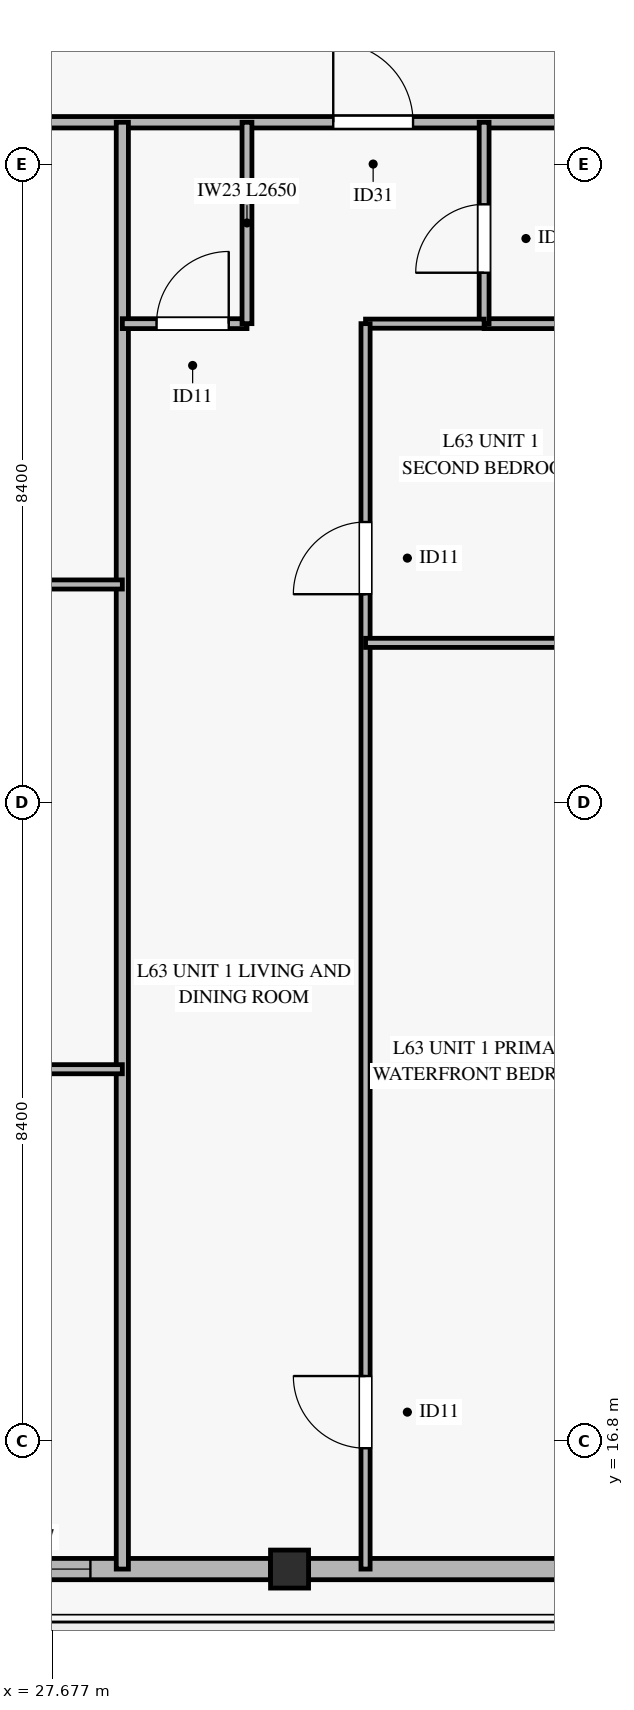
"""IFC4 building model, lengths in metres.
Left out: names, types, materials, properties, quantities, classifications, styles, units other than length and angle.
Written with IfcOpenShell. Run it as: python <this file> out.ifc"""

import sys

from ifc_helpers import new_model, si_unit, direction, frame, frame_2d, origin, origin_2d, place, context, subcontext, project, spatial, rectangle, hollow_rectangle, extrude, source, transform, mapped, element, fill, save


model = new_model("IFC4")
c1 = context("Model", 3, precision=1e-05, world=origin(), true_north=direction((0.0, 1.0)))
c2 = subcontext(c1, "Body", "Model", "MODEL_VIEW")
j1 = project(units=[si_unit("LENGTHUNIT", "METRE"), si_unit("PLANEANGLEUNIT", "RADIAN")], contexts=[c1])
p1 = place(None, origin())
s1 = spatial("IfcSite", under=j1, at=p1, CompositionType="ELEMENT")
p2 = place(p1, origin())
s2 = spatial("IfcBuilding", under=s1, at=p2, CompositionType="ELEMENT")
p3 = place(p2, frame((0.0, 0.0, 248.5)))
s3 = spatial("IfcBuildingStorey", under=s2, at=p3, CompositionType="ELEMENT", Elevation=248.5)
m1 = source(origin(), c2, "Body", "SweptSolid", [
    extrude(hollow_rectangle(XDim=0.5, YDim=0.5, WallThickness=0.024, at=origin_2d()), origin(), (0.0, 0.0, 1.0), 3.185),
])
p4 = place(p3, frame((30.8, 15.113, 0.0), z_axis=(0.0, 0.0, 1.0), x_axis=(1.0, 0.0, 0.0)))
e1 = element("IfcColumn", 1, at=p4, inside=s3, PredefinedType="COLUMN", context=c2, shape_type="MappedRepresentation", body=[
    mapped(m1, transform((0.0, 0.0, 0.0), x_axis=(1.0, 0.0, 0.0), y_axis=(0.0, 1.0, 0.0), z_axis=(0.0, 0.0, 1.0), scale=1.0)),
])
p5 = place(p3, frame((20.1, 15.113, 0.0), z_axis=(0.0, 0.0, 1.0), x_axis=(1.0, 0.0, 0.0)))
e2 = element("IfcWall", 2, at=p5, inside=s3, PredefinedType="SOLIDWALL", context=c2, shape_type="SweptSolid", body=[
    extrude(rectangle(XDim=10.45, YDim=0.28, at=frame_2d((5.225, 0.0))), origin(), (0.0, 0.0, 1.0), 2.815),
])
p6 = place(p5, frame((4.3, 0.0, 0.0)))
e3 = element("IfcOpeningElement", 3, at=p6, cuts=e2, PredefinedType="OPENING", context=c2, shape_type="SweptSolid", body=[
    extrude(rectangle(XDim=1.8, YDim=2.25, at=frame_2d((0.9, 1.125))), frame((0.0, 0.15, 0.0), z_axis=(0.0, -1.0, 0.0), x_axis=(1.0, 0.0, 0.0)), (0.0, 0.0, 1.0), 0.3),
])
p7 = place(p5, frame((0.505, 0.0, 0.45)))
e4 = element("IfcOpeningElement", 4, at=p7, cuts=e2, PredefinedType="OPENING", context=c2, shape_type="SweptSolid", body=[
    extrude(rectangle(XDim=1.2, YDim=2.0, at=frame_2d((0.6, 1.0))), frame((0.0, 0.15, 0.0), z_axis=(0.0, -1.0, 0.0), x_axis=(1.0, 0.0, 0.0)), (0.0, 0.0, 1.0), 0.3),
])
p8 = place(p5, frame((6.48, 0.0, 0.45)))
e5 = element("IfcOpeningElement", 5, at=p8, cuts=e2, PredefinedType="OPENING", context=c2, shape_type="SweptSolid", body=[
    extrude(rectangle(XDim=1.6, YDim=2.0, at=frame_2d((0.8, 1.0))), frame((0.0, 0.15, 0.0), z_axis=(0.0, -1.0, 0.0), x_axis=(1.0, 0.0, 0.0)), (0.0, 0.0, 1.0), 0.3),
])
p9 = place(p3, frame((31.05, 15.113, 0.0), z_axis=(0.0, 0.0, 1.0), x_axis=(1.0, 0.0, 0.0)))
e6 = element("IfcWall", 6, at=p9, inside=s3, PredefinedType="SOLIDWALL", context=c2, shape_type="SweptSolid", body=[
    extrude(rectangle(XDim=6.25, YDim=0.28, at=frame_2d((3.125, 0.0))), origin(), (0.0, 0.0, 1.0), 2.815),
])
p10 = place(p3, frame((8.364, 34.15, 0.0), z_axis=(0.0, 0.0, 1.0), x_axis=(1.0, 0.0, 0.0)))
e7 = element("IfcWall", 7, at=p10, inside=s3, PredefinedType="PARTITIONING", context=c2, shape_type="SweptSolid", body=[
    extrude(rectangle(XDim=53.673, YDim=0.15, at=frame_2d((26.836, 0.0))), origin(), (0.0, 0.0, 1.0), 2.47),
])
p11 = place(p10, frame((5.627, 0.0, 0.0)))
e8 = element("IfcOpeningElement", 8, at=p11, cuts=e7, PredefinedType="OPENING", context=c2, shape_type="SweptSolid", body=[
    extrude(rectangle(XDim=1.05, YDim=2.15, at=frame_2d((0.525, 1.075))), frame((0.0, 0.085, 0.0), z_axis=(0.0, -1.0, 0.0), x_axis=(1.0, 0.0, 0.0)), (0.0, 0.0, 1.0), 0.17),
])
p12 = place(p10, frame((16.561, 0.0, 0.0)))
e9 = element("IfcOpeningElement", 9, at=p12, cuts=e7, PredefinedType="OPENING", context=c2, shape_type="SweptSolid", body=[
    extrude(rectangle(XDim=1.05, YDim=2.15, at=frame_2d((0.525, 1.075))), frame((0.0, 0.085, 0.0), z_axis=(0.0, -1.0, 0.0), x_axis=(1.0, 0.0, 0.0)), (0.0, 0.0, 1.0), 0.17),
])
p13 = place(p10, frame((23.011, 0.0, 0.0)))
e10 = element("IfcOpeningElement", 10, at=p13, cuts=e7, PredefinedType="OPENING", context=c2, shape_type="SweptSolid", body=[
    extrude(rectangle(XDim=1.05, YDim=2.15, at=frame_2d((0.525, 1.075))), frame((0.0, 0.085, 0.0), z_axis=(0.0, -1.0, 0.0), x_axis=(1.0, 0.0, 0.0)), (0.0, 0.0, 1.0), 0.17),
])
p14 = place(p10, frame((29.411, 0.0, 0.0)))
e11 = element("IfcOpeningElement", 11, at=p14, cuts=e7, PredefinedType="OPENING", context=c2, shape_type="SweptSolid", body=[
    extrude(rectangle(XDim=1.05, YDim=2.15, at=frame_2d((0.525, 1.075))), frame((0.0, 0.085, 0.0), z_axis=(0.0, -1.0, 0.0), x_axis=(1.0, 0.0, 0.0)), (0.0, 0.0, 1.0), 0.17),
])
p15 = place(p10, frame((36.511, 0.0, 0.0)))
e12 = element("IfcOpeningElement", 12, at=p15, cuts=e7, PredefinedType="OPENING", context=c2, shape_type="SweptSolid", body=[
    extrude(rectangle(XDim=1.05, YDim=2.15, at=frame_2d((0.525, 1.075))), frame((0.0, 0.085, 0.0), z_axis=(0.0, -1.0, 0.0), x_axis=(1.0, 0.0, 0.0)), (0.0, 0.0, 1.0), 0.17),
])
p16 = place(p10, frame((45.807, 0.0, 0.0)))
e13 = element("IfcOpeningElement", 13, at=p16, cuts=e7, PredefinedType="OPENING", context=c2, shape_type="SweptSolid", body=[
    extrude(rectangle(XDim=1.05, YDim=2.15, at=frame_2d((0.525, 1.075))), frame((0.0, 0.085, 0.0), z_axis=(0.0, -1.0, 0.0), x_axis=(1.0, 0.0, 0.0)), (0.0, 0.0, 1.0), 0.17),
])
p17 = place(p3, frame((28.6, 15.113, 0.0), z_axis=(0.0, 0.0, 1.0), x_axis=(0.0, 1.0, 0.0)))
e14 = element("IfcWall", 14, at=p17, inside=s3, PredefinedType="PARTITIONING", context=c2, shape_type="SweptSolid", body=[
    extrude(rectangle(XDim=19.037, YDim=0.16, at=frame_2d((9.519, 0.0))), origin(), (0.0, 0.0, 1.0), 2.77),
])
p18 = place(p3, frame((22.4, 21.69, 0.0), z_axis=(0.0, 0.0, 1.0), x_axis=(1.0, 0.0, 0.0)))
e15 = element("IfcWall", 15, at=p18, inside=s3, PredefinedType="PARTITIONING", context=c2, shape_type="SweptSolid", body=[
    extrude(rectangle(XDim=6.2, YDim=0.12, at=frame_2d((3.1, 0.0))), origin(), (0.0, 0.0, 1.0), 3.185),
])
p19 = place(p18, frame((2.646, 0.0, 0.0)))
e16 = element("IfcOpeningElement", 16, at=p19, cuts=e15, PredefinedType="OPENING", context=c2, shape_type="SweptSolid", body=[
    extrude(rectangle(XDim=0.95, YDim=2.1, at=frame_2d((0.475, 1.05))), frame((0.0, 0.07, 0.0), z_axis=(0.0, -1.0, 0.0), x_axis=(1.0, 0.0, 0.0)), (0.0, 0.0, 1.0), 0.14),
])
p20 = place(p3, frame((22.4, 28.068, 0.0), z_axis=(0.0, 0.0, 1.0), x_axis=(1.0, 0.0, 0.0)))
e17 = element("IfcWall", 17, at=p20, inside=s3, PredefinedType="PARTITIONING", context=c2, shape_type="SweptSolid", body=[
    extrude(rectangle(XDim=6.2, YDim=0.12, at=frame_2d((3.1, 0.0))), origin(), (0.0, 0.0, 1.0), 3.185),
])
p21 = place(p20, frame((2.646, 0.0, 0.0)))
e18 = element("IfcOpeningElement", 18, at=p21, cuts=e17, PredefinedType="OPENING", context=c2, shape_type="SweptSolid", body=[
    extrude(rectangle(XDim=0.95, YDim=2.1, at=frame_2d((0.475, 1.05))), frame((0.0, 0.07, 0.0), z_axis=(0.0, -1.0, 0.0), x_axis=(1.0, 0.0, 0.0)), (0.0, 0.0, 1.0), 0.14),
])
p22 = place(p3, frame((28.6, 31.5, 0.0), z_axis=(0.0, 0.0, 1.0), x_axis=(1.0, 0.0, 0.0)))
e19 = element("IfcWall", 19, at=p22, inside=s3, PredefinedType="PARTITIONING", context=c2, shape_type="SweptSolid", body=[
    extrude(rectangle(XDim=1.64, YDim=0.13, at=frame_2d((0.82, 0.0))), origin(), (0.0, 0.0, 1.0), 3.185),
])
p23 = place(p22, frame((0.45, 0.0, 0.0)))
e20 = element("IfcOpeningElement", 20, at=p23, cuts=e19, PredefinedType="OPENING", context=c2, shape_type="SweptSolid", body=[
    extrude(rectangle(XDim=0.95, YDim=2.1, at=frame_2d((0.475, 1.05))), frame((0.0, 0.075, 0.0), z_axis=(0.0, -1.0, 0.0), x_axis=(1.0, 0.0, 0.0)), (0.0, 0.0, 1.0), 0.15),
])
p24 = place(p3, frame((30.24, 31.5, 0.0), z_axis=(0.0, 0.0, 1.0), x_axis=(0.0, 1.0, 0.0)))
e21 = element("IfcWall", 21, at=p24, inside=s3, PredefinedType="PARTITIONING", context=c2, shape_type="SweptSolid", body=[
    extrude(rectangle(XDim=2.65, YDim=0.13, at=frame_2d((1.325, 0.0))), origin(), (0.0, 0.0, 1.0), 2.77),
])
p25 = place(p3, frame((33.36, 31.5, 0.0), z_axis=(0.0, 0.0, 1.0), x_axis=(1.0, 0.0, 0.0)))
e22 = element("IfcWall", 22, at=p25, inside=s3, PredefinedType="PARTITIONING", context=c2, shape_type="SweptSolid", body=[
    extrude(rectangle(XDim=1.64, YDim=0.13, at=frame_2d((0.82, 0.0))), origin(), (0.0, 0.0, 1.0), 3.185),
])
p26 = place(p3, frame((33.36, 31.5, 0.0), z_axis=(0.0, 0.0, 1.0), x_axis=(0.0, 1.0, 0.0)))
e23 = element("IfcWall", 23, at=p26, inside=s3, PredefinedType="PARTITIONING", context=c2, shape_type="SweptSolid", body=[
    extrude(rectangle(XDim=2.65, YDim=0.13, at=frame_2d((1.325, 0.0))), origin(), (0.0, 0.0, 1.0), 2.77),
])
p27 = place(p26, frame((0.67, 0.0, 0.0)))
e24 = element("IfcOpeningElement", 24, at=p27, cuts=e23, PredefinedType="OPENING", context=c2, shape_type="SweptSolid", body=[
    extrude(rectangle(XDim=0.9, YDim=2.1, at=frame_2d((0.45, 1.05))), frame((0.0, 0.075, 0.0), z_axis=(0.0, -1.0, 0.0), x_axis=(1.0, 0.0, 0.0)), (0.0, 0.0, 1.0), 0.15),
])
p28 = place(p3, frame((31.8, 31.5, 0.0), z_axis=(0.0, 0.0, 1.0), x_axis=(1.0, 0.0, 0.0)))
e25 = element("IfcWall", 25, at=p28, inside=s3, PredefinedType="PARTITIONING", context=c2, shape_type="SweptSolid", body=[
    extrude(rectangle(XDim=1.56, YDim=0.12, at=frame_2d((0.78, 0.0))), origin(), (0.0, 0.0, 1.0), 3.185),
])
p29 = place(p3, frame((31.8, 15.113, 0.0), z_axis=(0.0, 0.0, 1.0), x_axis=(0.0, 1.0, 0.0)))
e26 = element("IfcWall", 26, at=p29, inside=s3, PredefinedType="PARTITIONING", context=c2, shape_type="SweptSolid", body=[
    extrude(rectangle(XDim=16.387, YDim=0.12, at=frame_2d((8.193, 0.0))), origin(), (0.0, 0.0, 1.0), 2.77),
])
p30 = place(p29, frame((1.59, 0.0, 0.0)))
e27 = element("IfcOpeningElement", 27, at=p30, cuts=e26, PredefinedType="OPENING", context=c2, shape_type="SweptSolid", body=[
    extrude(rectangle(XDim=0.95, YDim=2.1, at=frame_2d((0.475, 1.05))), frame((0.0, 0.07, 0.0), z_axis=(0.0, -1.0, 0.0), x_axis=(1.0, 0.0, 0.0)), (0.0, 0.0, 1.0), 0.14),
])
p31 = place(p29, frame((12.827, 0.0, 0.0)))
e28 = element("IfcOpeningElement", 28, at=p31, cuts=e26, PredefinedType="OPENING", context=c2, shape_type="SweptSolid", body=[
    extrude(rectangle(XDim=0.95, YDim=2.1, at=frame_2d((0.475, 1.05))), frame((0.0, 0.07, 0.0), z_axis=(0.0, -1.0, 0.0), x_axis=(1.0, 0.0, 0.0)), (0.0, 0.0, 1.0), 0.14),
])
p32 = place(p3, frame((31.8, 27.3, 0.0), z_axis=(0.0, 0.0, 1.0), x_axis=(1.0, 0.0, 0.0)))
e29 = element("IfcWall", 29, at=p32, inside=s3, PredefinedType="PARTITIONING", context=c2, shape_type="SweptSolid", body=[
    extrude(rectangle(XDim=3.2, YDim=0.12, at=frame_2d((1.6, 0.0))), origin(), (0.0, 0.0, 1.0), 3.185),
])
m2 = source(origin(), c2, "Body", "SweptSolid", [
    extrude(rectangle(XDim=1.6, YDim=2.0, at=frame_2d((0.8, 1.0))), frame((0.0, 0.03, 0.0), z_axis=(0.0, -1.0, 0.0), x_axis=(1.0, 0.0, 0.0)), (0.0, 0.0, 1.0), 0.06),
])
p33 = place(p8, origin())
e30 = element("IfcWindow", 30, at=p33, inside=s3, PartitioningType="SINGLE_PANEL", PredefinedType="WINDOW", context=c2, shape_type="MappedRepresentation", body=[
    mapped(m2, transform((0.0, 0.0, 0.0), x_axis=(1.0, 0.0, 0.0), y_axis=(0.0, 1.0, 0.0), z_axis=(0.0, 0.0, 1.0), scale=1.0)),
])
fill(e5, e30)
m3 = source(origin(), c2, "Body", "SweptSolid", [
    extrude(rectangle(XDim=1.05, YDim=2.15, at=frame_2d((0.525, 1.075))), frame((0.0, 0.025, 0.0), z_axis=(0.0, -1.0, 0.0), x_axis=(1.0, 0.0, 0.0)), (0.0, 0.0, 1.0), 0.05),
])
p34 = place(p13, origin())
e31 = element("IfcDoor", 31, at=p34, inside=s3, OperationType="SINGLE_SWING_LEFT", PredefinedType="DOOR", context=c2, shape_type="MappedRepresentation", body=[
    mapped(m3, transform((0.0, 0.0, 0.0), x_axis=(1.0, 0.0, 0.0), y_axis=(0.0, 1.0, 0.0), z_axis=(0.0, 0.0, 1.0), scale=1.0)),
])
fill(e10, e31)
m4 = source(origin(), c2, "Body", "SweptSolid", [
    extrude(rectangle(XDim=0.95, YDim=2.1, at=frame_2d((0.475, 1.05))), frame((0.0, 0.025, 0.0), z_axis=(0.0, -1.0, 0.0), x_axis=(1.0, 0.0, 0.0)), (0.0, 0.0, 1.0), 0.05),
])
p35 = place(p23, origin())
e32 = element("IfcDoor", 32, at=p35, inside=s3, OperationType="SINGLE_SWING_RIGHT", PredefinedType="DOOR", context=c2, shape_type="MappedRepresentation", body=[
    mapped(m4, transform((0.0, 0.0, 0.0), x_axis=(1.0, 0.0, 0.0), y_axis=(0.0, 1.0, 0.0), z_axis=(0.0, 0.0, 1.0), scale=1.0)),
])
fill(e20, e32)
m5 = source(origin(), c2, "Body", "SweptSolid", [
    extrude(rectangle(XDim=0.9, YDim=2.1, at=frame_2d((0.45, 1.05))), frame((0.0, 0.025, 0.0), z_axis=(0.0, -1.0, 0.0), x_axis=(1.0, 0.0, 0.0)), (0.0, 0.0, 1.0), 0.05),
])
p36 = place(p27, origin())
e33 = element("IfcDoor", 33, at=p36, inside=s3, OperationType="SINGLE_SWING_LEFT", PredefinedType="DOOR", context=c2, shape_type="MappedRepresentation", body=[
    mapped(m5, transform((0.0, 0.0, 0.0), x_axis=(1.0, 0.0, 0.0), y_axis=(0.0, 1.0, 0.0), z_axis=(0.0, 0.0, 1.0), scale=1.0)),
])
fill(e24, e33)
p37 = place(p30, origin())
e34 = element("IfcDoor", 34, at=p37, inside=s3, OperationType="SINGLE_SWING_RIGHT", PredefinedType="DOOR", context=c2, shape_type="MappedRepresentation", body=[
    mapped(m4, transform((0.0, 0.0, 0.0), x_axis=(1.0, 0.0, 0.0), y_axis=(0.0, 1.0, 0.0), z_axis=(0.0, 0.0, 1.0), scale=1.0)),
])
fill(e27, e34)
p38 = place(p31, origin())
e35 = element("IfcDoor", 35, at=p38, inside=s3, OperationType="SINGLE_SWING_LEFT", PredefinedType="DOOR", context=c2, shape_type="MappedRepresentation", body=[
    mapped(m4, transform((0.0, 0.0, 0.0), x_axis=(1.0, 0.0, 0.0), y_axis=(0.0, 1.0, 0.0), z_axis=(0.0, 0.0, 1.0), scale=1.0)),
])
fill(e28, e35)
save(model, sys.argv[1])
